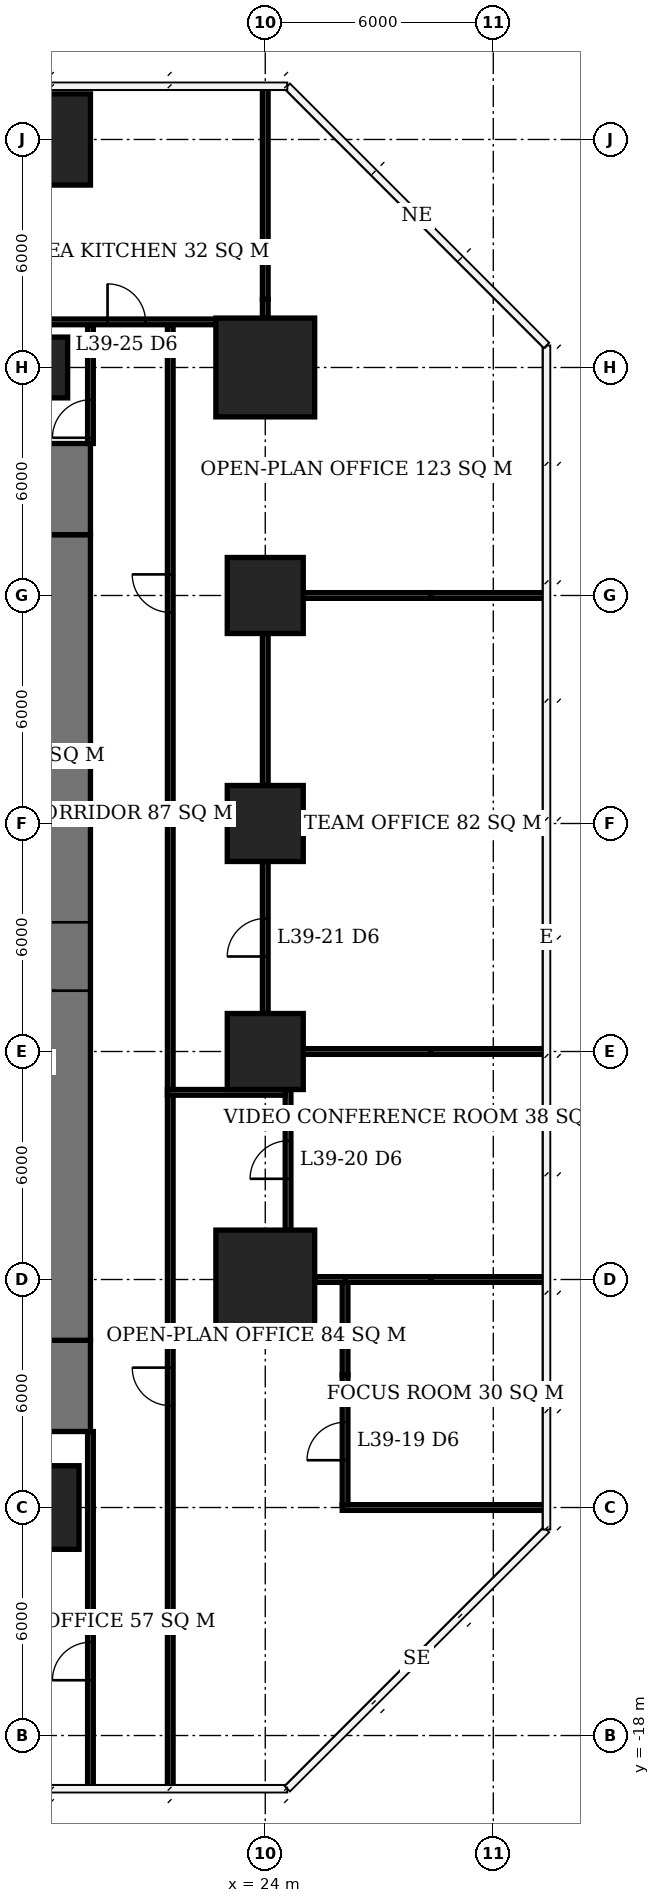
"""IFC4 building model, lengths in metres.
Left out: names, types, materials, properties, quantities, classifications, styles, units other than length and angle.
Written with IfcOpenShell. Run it as: python <this file> out.ifc"""

import sys

from ifc_helpers import new_model, si_unit, direction, frame, frame_2d, origin, origin_2d, place, context, subcontext, project, spatial, rectangle, extrude, element, fill, save


model = new_model("IFC4")
c1 = context("Model", 3, precision=1e-05, world=origin(), true_north=direction((0.0, 1.0)))
c2 = subcontext(c1, "Body", "Model", "MODEL_VIEW")
j1 = project(units=[si_unit("LENGTHUNIT", "METRE"), si_unit("PLANEANGLEUNIT", "RADIAN")], contexts=[c1])
p1 = place(None, origin())
s1 = spatial("IfcSite", under=j1, at=p1, CompositionType="ELEMENT")
p2 = place(p1, origin())
s2 = spatial("IfcBuilding", under=s1, at=p2, CompositionType="ELEMENT")
p3 = place(p2, frame((0.0, 0.0, 160.1)))
s3 = spatial("IfcBuildingStorey", under=s2, at=p3, CompositionType="ELEMENT", Elevation=160.1)
p4 = place(p3, frame((18.0, -12.0, 0.0), z_axis=(0.0, 0.0, 1.0), x_axis=(1.0, 0.0, 0.0)))
e1 = element("IfcColumn", 1, at=p4, inside=s3, PredefinedType="COLUMN", context=c2, shape_type="SweptSolid", body=[
    extrude(rectangle(XDim=2.2, YDim=2.2, at=origin_2d()), origin(), (0.0, 0.0, 1.0), 3.9),
])
p5 = place(p3, frame((18.0, 18.0, 0.0), z_axis=(0.0, 0.0, 1.0), x_axis=(1.0, 0.0, 0.0)))
e2 = element("IfcColumn", 2, at=p5, inside=s3, PredefinedType="COLUMN", context=c2, shape_type="SweptSolid", body=[
    extrude(rectangle(XDim=1.6, YDim=1.6, at=origin_2d()), origin(), (0.0, 0.0, 1.0), 3.9),
])
p6 = place(p3, frame((18.0, 24.0, 0.0), z_axis=(0.0, 0.0, 1.0), x_axis=(1.0, 0.0, 0.0)))
e3 = element("IfcColumn", 3, at=p6, inside=s3, PredefinedType="COLUMN", context=c2, shape_type="SweptSolid", body=[
    extrude(rectangle(XDim=2.8, YDim=2.4, at=origin_2d()), origin(), (0.0, 0.0, 1.0), 3.9),
])
p7 = place(p3, frame((24.0, -6.0, 0.0), z_axis=(0.0, 0.0, 1.0), x_axis=(1.0, 0.0, 0.0)))
e4 = element("IfcColumn", 4, at=p7, inside=s3, PredefinedType="COLUMN", context=c2, shape_type="SweptSolid", body=[
    extrude(rectangle(XDim=2.6, YDim=2.6, at=origin_2d()), origin(), (0.0, 0.0, 1.0), 3.9),
])
for number, where, z_axis, x_axis in (
    (5, (24.0, 0.0, 0.0), (0.0, 0.0, 1.0), (1.0, 0.0, 0.0)),
    (6, (24.0, 6.0, 0.0), (0.0, 0.0, 1.0), (1.0, 0.0, 0.0)),
    (7, (24.0, 12.0, 0.0), (0.0, 0.0, 1.0), (1.0, 0.0, 0.0)),
):
    element("IfcColumn", number, at=place(p3, frame(where, z_axis=z_axis, x_axis=x_axis)), inside=s3, PredefinedType="COLUMN", context=c2, shape_type="SweptSolid", body=[
        extrude(rectangle(XDim=2.0, YDim=2.0, at=origin_2d()), origin(), (0.0, 0.0, 1.0), 3.9),
    ])
p8 = place(p3, frame((24.0, 18.0, 0.0), z_axis=(0.0, 0.0, 1.0), x_axis=(1.0, 0.0, 0.0)))
e8 = element("IfcColumn", 8, at=p8, inside=s3, PredefinedType="COLUMN", context=c2, shape_type="SweptSolid", body=[
    extrude(rectangle(XDim=2.6, YDim=2.6, at=origin_2d()), origin(), (0.0, 0.0, 1.0), 3.9),
])
p9 = place(p3, frame((18.5, -7.6, 0.0), z_axis=(0.0, 0.0, 1.0), x_axis=(0.0, 1.0, 0.0)))
e9 = element("IfcWall", 9, at=p9, inside=s3, PredefinedType="SHEAR", context=c2, shape_type="SweptSolid", body=[
    extrude(rectangle(XDim=21.2, YDim=1.8, at=frame_2d((10.6, 0.0))), origin(), (0.0, 0.0, 1.0), 3.9),
])
p10 = place(p9, frame((9.2, 0.0, 0.0)))
e10 = element("IfcOpeningElement", 10, at=p10, cuts=e9, PredefinedType="OPENING", context=c2, shape_type="SweptSolid", body=[
    extrude(rectangle(XDim=1.8, YDim=2.4, at=frame_2d((0.9, 1.2))), frame((0.0, 0.91, 0.0), z_axis=(0.0, -1.0, 0.0), x_axis=(1.0, 0.0, 0.0)), (0.0, 0.0, 1.0), 1.82),
])
for number, where, z_axis, x_axis in (
    (11, (18.5, -10.0, 0.0), (0.0, 0.0, 1.0), (0.0, 1.0, 0.0)),
    (12, (18.5, 13.6, 0.0), (0.0, 0.0, 1.0), (0.0, 1.0, 0.0)),
):
    element("IfcWall", number, at=place(p3, frame(where, z_axis=z_axis, x_axis=x_axis)), inside=s3, PredefinedType="SHEAR", context=c2, shape_type="SweptSolid", body=[
        extrude(rectangle(XDim=2.4, YDim=1.8, at=frame_2d((1.2, 0.0))), origin(), (0.0, 0.0, 1.0), 3.9),
    ])
p11 = place(p3, frame((26.025, -12.0, 0.0), z_axis=(0.0, 0.0, 1.0), x_axis=(1.0, 0.0, 0.0)))
e13 = element("IfcWall", 13, at=p11, inside=s3, PredefinedType="PARTITIONING", context=c2, shape_type="SweptSolid", body=[
    extrude(rectangle(XDim=5.375, YDim=0.15, at=frame_2d((2.688, 0.0))), origin(), (0.0, 0.0, 1.0), 3.65),
])
p12 = place(p3, frame((25.3, -6.0, 0.0), z_axis=(0.0, 0.0, 1.0), x_axis=(1.0, 0.0, 0.0)))
e14 = element("IfcWall", 14, at=p12, inside=s3, PredefinedType="PARTITIONING", context=c2, shape_type="SweptSolid", body=[
    extrude(rectangle(XDim=0.875, YDim=0.15, at=frame_2d((0.438, 0.0))), origin(), (0.0, 0.0, 1.0), 2.15),
])
p13 = place(p3, frame((26.1, -6.0, 0.0), z_axis=(0.0, 0.0, 1.0), x_axis=(1.0, 0.0, 0.0)))
e15 = element("IfcWall", 15, at=p13, inside=s3, PredefinedType="PARTITIONING", context=c2, shape_type="SweptSolid", body=[
    extrude(rectangle(XDim=2.26, YDim=0.15, at=frame_2d((1.13, 0.0))), origin(), (0.0, 0.0, 1.0), 2.15),
])
p14 = place(p3, frame((28.36, -6.0, 0.0), z_axis=(0.0, 0.0, 1.0), x_axis=(1.0, 0.0, 0.0)))
e16 = element("IfcWall", 16, at=p14, inside=s3, PredefinedType="PARTITIONING", context=c2, shape_type="SweptSolid", body=[
    extrude(rectangle(XDim=3.04, YDim=0.15, at=frame_2d((1.52, 0.0))), origin(), (0.0, 0.0, 1.0), 3.65),
])
p15 = place(p3, frame((25.0, 0.0, 0.0), z_axis=(0.0, 0.0, 1.0), x_axis=(1.0, 0.0, 0.0)))
e17 = element("IfcWall", 17, at=p15, inside=s3, PredefinedType="PARTITIONING", context=c2, shape_type="SweptSolid", body=[
    extrude(rectangle(XDim=3.36, YDim=0.15, at=frame_2d((1.68, 0.0))), origin(), (0.0, 0.0, 1.0), 2.15),
])
p16 = place(p3, frame((28.36, 0.0, 0.0), z_axis=(0.0, 0.0, 1.0), x_axis=(1.0, 0.0, 0.0)))
e18 = element("IfcWall", 18, at=p16, inside=s3, PredefinedType="PARTITIONING", context=c2, shape_type="SweptSolid", body=[
    extrude(rectangle(XDim=2.99, YDim=0.15, at=frame_2d((1.495, 0.0))), origin(), (0.0, 0.0, 1.0), 3.65),
])
p17 = place(p3, frame((25.0, 12.0, 0.0), z_axis=(0.0, 0.0, 1.0), x_axis=(1.0, 0.0, 0.0)))
e19 = element("IfcWall", 19, at=p17, inside=s3, PredefinedType="PARTITIONING", context=c2, shape_type="SweptSolid", body=[
    extrude(rectangle(XDim=3.36, YDim=0.15, at=frame_2d((1.68, 0.0))), origin(), (0.0, 0.0, 1.0), 2.15),
])
p18 = place(p3, frame((28.36, 12.0, 0.0), z_axis=(0.0, 0.0, 1.0), x_axis=(1.0, 0.0, 0.0)))
e20 = element("IfcWall", 20, at=p18, inside=s3, PredefinedType="PARTITIONING", context=c2, shape_type="SweptSolid", body=[
    extrude(rectangle(XDim=3.04, YDim=0.15, at=frame_2d((1.52, 0.0))), origin(), (0.0, 0.0, 1.0), 3.65),
])
p19 = place(p3, frame((18.075, 19.2, 0.0), z_axis=(0.0, 0.0, 1.0), x_axis=(1.0, 0.0, 0.0)))
e21 = element("IfcWall", 21, at=p19, inside=s3, PredefinedType="PARTITIONING", context=c2, shape_type="SweptSolid", body=[
    extrude(rectangle(XDim=4.625, YDim=0.15, at=frame_2d((2.312, 0.0))), origin(), (0.0, 0.0, 1.0), 3.65),
])
p20 = place(p19, frame((1.775, 0.0, 0.0)))
e22 = element("IfcOpeningElement", 22, at=p20, cuts=e21, PredefinedType="OPENING", context=c2, shape_type="SweptSolid", body=[
    extrude(rectangle(XDim=1.0, YDim=2.1, at=frame_2d((0.5, 1.05))), frame((0.0, 0.085, 0.0), z_axis=(0.0, -1.0, 0.0), x_axis=(1.0, 0.0, 0.0)), (0.0, 0.0, 1.0), 0.17),
])
p21 = place(p3, frame((24.0, 1.0, 0.0), z_axis=(0.0, 0.0, 1.0), x_axis=(0.0, 1.0, 0.0)))
e23 = element("IfcWall", 23, at=p21, inside=s3, PredefinedType="PARTITIONING", context=c2, shape_type="SweptSolid", body=[
    extrude(rectangle(XDim=4.0, YDim=0.15, at=frame_2d((2.0, 0.0))), origin(), (0.0, 0.0, 1.0), 3.65),
])
p22 = place(p21, frame((1.5, 0.0, 0.0)))
e24 = element("IfcOpeningElement", 24, at=p22, cuts=e23, PredefinedType="OPENING", context=c2, shape_type="SweptSolid", body=[
    extrude(rectangle(XDim=1.0, YDim=2.1, at=frame_2d((0.5, 1.05))), frame((0.0, 0.085, 0.0), z_axis=(0.0, -1.0, 0.0), x_axis=(1.0, 0.0, 0.0)), (0.0, 0.0, 1.0), 0.17),
])
p23 = place(p3, frame((24.0, 7.0, 0.0), z_axis=(0.0, 0.0, 1.0), x_axis=(0.0, 1.0, 0.0)))
e25 = element("IfcWall", 25, at=p23, inside=s3, PredefinedType="PARTITIONING", context=c2, shape_type="SweptSolid", body=[
    extrude(rectangle(XDim=4.0, YDim=0.15, at=frame_2d((2.0, 0.0))), origin(), (0.0, 0.0, 1.0), 3.65),
])
p24 = place(p3, frame((24.0, 19.3, 0.0), z_axis=(0.0, 0.0, 1.0), x_axis=(0.0, 1.0, 0.0)))
e26 = element("IfcWall", 26, at=p24, inside=s3, PredefinedType="PARTITIONING", context=c2, shape_type="SweptSolid", body=[
    extrude(rectangle(XDim=0.492, YDim=0.15, at=frame_2d((0.246, 0.0))), origin(), (0.0, 0.0, 1.0), 2.15),
])
p25 = place(p3, frame((24.0, 19.792, 0.0), z_axis=(0.0, 0.0, 1.0), x_axis=(0.0, 1.0, 0.0)))
e27 = element("IfcWall", 27, at=p25, inside=s3, PredefinedType="PARTITIONING", context=c2, shape_type="SweptSolid", body=[
    extrude(rectangle(XDim=5.597, YDim=0.15, at=frame_2d((2.799, 0.0))), origin(), (0.0, 0.0, 1.0), 3.65),
])
p26 = place(p3, frame((24.6, -4.7, 0.0), z_axis=(0.0, 0.0, 1.0), x_axis=(0.0, 1.0, 0.0)))
e28 = element("IfcWall", 28, at=p26, inside=s3, PredefinedType="PARTITIONING", context=c2, shape_type="SweptSolid", body=[
    extrude(rectangle(XDim=3.7, YDim=0.15, at=frame_2d((1.85, 0.0))), origin(), (0.0, 0.0, 1.0), 3.65),
])
p27 = place(p26, frame((1.35, 0.0, 0.0)))
e29 = element("IfcOpeningElement", 29, at=p27, cuts=e28, PredefinedType="OPENING", context=c2, shape_type="SweptSolid", body=[
    extrude(rectangle(XDim=1.0, YDim=2.1, at=frame_2d((0.5, 1.05))), frame((0.0, 0.085, 0.0), z_axis=(0.0, -1.0, 0.0), x_axis=(1.0, 0.0, 0.0)), (0.0, 0.0, 1.0), 0.17),
])
p28 = place(p3, frame((26.1, -11.925, 0.0), z_axis=(0.0, 0.0, 1.0), x_axis=(0.0, 1.0, 0.0)))
e30 = element("IfcWall", 30, at=p28, inside=s3, PredefinedType="PARTITIONING", context=c2, shape_type="SweptSolid", body=[
    extrude(rectangle(XDim=3.414, YDim=0.15, at=frame_2d((1.707, 0.0))), origin(), (0.0, 0.0, 1.0), 3.65),
])
p29 = place(p28, frame((1.17, 0.0, 0.0)))
e31 = element("IfcOpeningElement", 31, at=p29, cuts=e30, PredefinedType="OPENING", context=c2, shape_type="SweptSolid", body=[
    extrude(rectangle(XDim=1.0, YDim=2.1, at=frame_2d((0.5, 1.05))), frame((0.0, 0.085, 0.0), z_axis=(0.0, -1.0, 0.0), x_axis=(1.0, 0.0, 0.0)), (0.0, 0.0, 1.0), 0.17),
])
p30 = place(p3, frame((26.1, -8.511, 0.0), z_axis=(0.0, 0.0, 1.0), x_axis=(0.0, 1.0, 0.0)))
e32 = element("IfcWall", 32, at=p30, inside=s3, PredefinedType="PARTITIONING", context=c2, shape_type="SweptSolid", body=[
    extrude(rectangle(XDim=2.436, YDim=0.15, at=frame_2d((1.218, 0.0))), origin(), (0.0, 0.0, 1.0), 2.15),
])
p31 = place(p3, frame((19.4, -19.4, 0.0), z_axis=(0.0, 0.0, 1.0), x_axis=(0.0, 1.0, 0.0)))
e33 = element("IfcWall", 33, at=p31, inside=s3, PredefinedType="PARTITIONING", context=c2, shape_type="SweptSolid", body=[
    extrude(rectangle(XDim=9.4, YDim=0.15, at=frame_2d((4.7, 0.0))), origin(), (0.0, 0.0, 1.0), 3.65),
])
p32 = place(p31, frame((2.855, 0.0, 0.0)))
e34 = element("IfcOpeningElement", 34, at=p32, cuts=e33, PredefinedType="OPENING", context=c2, shape_type="SweptSolid", body=[
    extrude(rectangle(XDim=1.0, YDim=2.1, at=frame_2d((0.5, 1.05))), frame((0.0, 0.085, 0.0), z_axis=(0.0, -1.0, 0.0), x_axis=(1.0, 0.0, 0.0)), (0.0, 0.0, 1.0), 0.17),
])
p33 = place(p3, frame((19.4, 16.0, 0.0), z_axis=(0.0, 0.0, 1.0), x_axis=(0.0, 1.0, 0.0)))
e35 = element("IfcWall", 35, at=p33, inside=s3, PredefinedType="PARTITIONING", context=c2, shape_type="SweptSolid", body=[
    extrude(rectangle(XDim=3.125, YDim=0.15, at=frame_2d((1.562, 0.0))), origin(), (0.0, 0.0, 1.0), 3.65),
])
p34 = place(p33, frame((0.15, 0.0, 0.0)))
e36 = element("IfcOpeningElement", 36, at=p34, cuts=e35, PredefinedType="OPENING", context=c2, shape_type="SweptSolid", body=[
    extrude(rectangle(XDim=1.0, YDim=2.1, at=frame_2d((0.5, 1.05))), frame((0.0, 0.085, 0.0), z_axis=(0.0, -1.0, 0.0), x_axis=(1.0, 0.0, 0.0)), (0.0, 0.0, 1.0), 0.17),
])
p35 = place(p3, frame((21.5, -19.35, 0.0), z_axis=(0.0, 0.0, 1.0), x_axis=(0.0, 1.0, 0.0)))
e37 = element("IfcWall", 37, at=p35, inside=s3, PredefinedType="PARTITIONING", context=c2, shape_type="SweptSolid", body=[
    extrude(rectangle(XDim=18.2, YDim=0.15, at=frame_2d((9.1, 0.0))), origin(), (0.0, 0.0, 1.0), 3.65),
])
p36 = place(p35, frame((10.031, 0.0, 0.0)))
e38 = element("IfcOpeningElement", 38, at=p36, cuts=e37, PredefinedType="OPENING", context=c2, shape_type="SweptSolid", body=[
    extrude(rectangle(XDim=1.0, YDim=2.1, at=frame_2d((0.5, 1.05))), frame((0.0, 0.085, 0.0), z_axis=(0.0, -1.0, 0.0), x_axis=(1.0, 0.0, 0.0)), (0.0, 0.0, 1.0), 0.17),
])
p37 = place(p3, frame((21.5, -1.0, 0.0), z_axis=(0.0, 0.0, 1.0), x_axis=(0.0, 1.0, 0.0)))
e39 = element("IfcWall", 39, at=p37, inside=s3, PredefinedType="PARTITIONING", context=c2, shape_type="SweptSolid", body=[
    extrude(rectangle(XDim=20.125, YDim=0.15, at=frame_2d((10.062, 0.0))), origin(), (0.0, 0.0, 1.0), 3.65),
])
p38 = place(p37, frame((12.555, 0.0, 0.0)))
e40 = element("IfcOpeningElement", 40, at=p38, cuts=e39, PredefinedType="OPENING", context=c2, shape_type="SweptSolid", body=[
    extrude(rectangle(XDim=1.0, YDim=2.1, at=frame_2d((0.5, 1.05))), frame((0.0, 0.085, 0.0), z_axis=(0.0, -1.0, 0.0), x_axis=(1.0, 0.0, 0.0)), (0.0, 0.0, 1.0), 0.17),
])
p39 = place(p3, frame((21.425, -1.075, 0.0), z_axis=(0.0, 0.0, 1.0), x_axis=(1.0, 0.0, 0.0)))
e41 = element("IfcWall", 41, at=p39, inside=s3, PredefinedType="PARTITIONING", context=c2, shape_type="SweptSolid", body=[
    extrude(rectangle(XDim=3.1, YDim=0.15, at=frame_2d((1.55, 0.0))), origin(), (0.0, 0.0, 1.0), 3.65),
])
p40 = place(p10, origin())
e42 = element("IfcDoor", 42, at=p40, inside=s3, OperationType="DOUBLE_DOOR_SINGLE_SWING", PredefinedType="DOOR", context=c2, shape_type="SweptSolid", body=[
    extrude(rectangle(XDim=1.8, YDim=2.4, at=frame_2d((0.9, 1.2))), frame((0.0, 0.025, 0.0), z_axis=(0.0, -1.0, 0.0), x_axis=(1.0, 0.0, 0.0)), (0.0, 0.0, 1.0), 0.05),
])
fill(e10, e42)
p41 = place(p29, origin())
e43 = element("IfcDoor", 43, at=p41, inside=s3, OperationType="SINGLE_SWING_LEFT", PredefinedType="DOOR", context=c2, shape_type="SweptSolid", body=[
    extrude(rectangle(XDim=1.0, YDim=2.1, at=frame_2d((0.5, 1.05))), frame((0.0, 0.025, 0.0), z_axis=(0.0, -1.0, 0.0), x_axis=(1.0, 0.0, 0.0)), (0.0, 0.0, 1.0), 0.05),
])
fill(e31, e43)
p42 = place(p27, origin())
e44 = element("IfcDoor", 44, at=p42, inside=s3, OperationType="SINGLE_SWING_LEFT", PredefinedType="DOOR", context=c2, shape_type="SweptSolid", body=[
    extrude(rectangle(XDim=1.0, YDim=2.1, at=frame_2d((0.5, 1.05))), frame((0.0, 0.025, 0.0), z_axis=(0.0, -1.0, 0.0), x_axis=(1.0, 0.0, 0.0)), (0.0, 0.0, 1.0), 0.05),
])
fill(e29, e44)
p43 = place(p22, origin())
e45 = element("IfcDoor", 45, at=p43, inside=s3, OperationType="SINGLE_SWING_LEFT", PredefinedType="DOOR", context=c2, shape_type="SweptSolid", body=[
    extrude(rectangle(XDim=1.0, YDim=2.1, at=frame_2d((0.5, 1.05))), frame((0.0, 0.025, 0.0), z_axis=(0.0, -1.0, 0.0), x_axis=(1.0, 0.0, 0.0)), (0.0, 0.0, 1.0), 0.05),
])
fill(e24, e45)
p44 = place(p20, origin())
e46 = element("IfcDoor", 46, at=p44, inside=s3, OperationType="SINGLE_SWING_LEFT", PredefinedType="DOOR", context=c2, shape_type="SweptSolid", body=[
    extrude(rectangle(XDim=1.0, YDim=2.1, at=frame_2d((0.5, 1.05))), frame((0.0, 0.025, 0.0), z_axis=(0.0, -1.0, 0.0), x_axis=(1.0, 0.0, 0.0)), (0.0, 0.0, 1.0), 0.05),
])
fill(e22, e46)
p45 = place(p36, origin())
e47 = element("IfcDoor", 47, at=p45, inside=s3, OperationType="SINGLE_SWING_RIGHT", PredefinedType="DOOR", context=c2, shape_type="SweptSolid", body=[
    extrude(rectangle(XDim=1.0, YDim=2.1, at=frame_2d((0.5, 1.05))), frame((0.0, 0.025, 0.0), z_axis=(0.0, -1.0, 0.0), x_axis=(1.0, 0.0, 0.0)), (0.0, 0.0, 1.0), 0.05),
])
fill(e38, e47)
p46 = place(p32, origin())
e48 = element("IfcDoor", 48, at=p46, inside=s3, OperationType="SINGLE_SWING_LEFT", PredefinedType="DOOR", context=c2, shape_type="SweptSolid", body=[
    extrude(rectangle(XDim=1.0, YDim=2.1, at=frame_2d((0.5, 1.05))), frame((0.0, 0.025, 0.0), z_axis=(0.0, -1.0, 0.0), x_axis=(1.0, 0.0, 0.0)), (0.0, 0.0, 1.0), 0.05),
])
fill(e34, e48)
p47 = place(p38, origin())
e49 = element("IfcDoor", 49, at=p47, inside=s3, OperationType="SINGLE_SWING_RIGHT", PredefinedType="DOOR", context=c2, shape_type="SweptSolid", body=[
    extrude(rectangle(XDim=1.0, YDim=2.1, at=frame_2d((0.5, 1.05))), frame((0.0, 0.025, 0.0), z_axis=(0.0, -1.0, 0.0), x_axis=(1.0, 0.0, 0.0)), (0.0, 0.0, 1.0), 0.05),
])
fill(e40, e49)
p48 = place(p34, origin())
e50 = element("IfcDoor", 50, at=p48, inside=s3, OperationType="SINGLE_SWING_LEFT", PredefinedType="DOOR", context=c2, shape_type="SweptSolid", body=[
    extrude(rectangle(XDim=1.0, YDim=2.1, at=frame_2d((0.5, 1.05))), frame((0.0, 0.025, 0.0), z_axis=(0.0, -1.0, 0.0), x_axis=(1.0, 0.0, 0.0)), (0.0, 0.0, 1.0), 0.05),
])
fill(e36, e50)
save(model, sys.argv[1])
